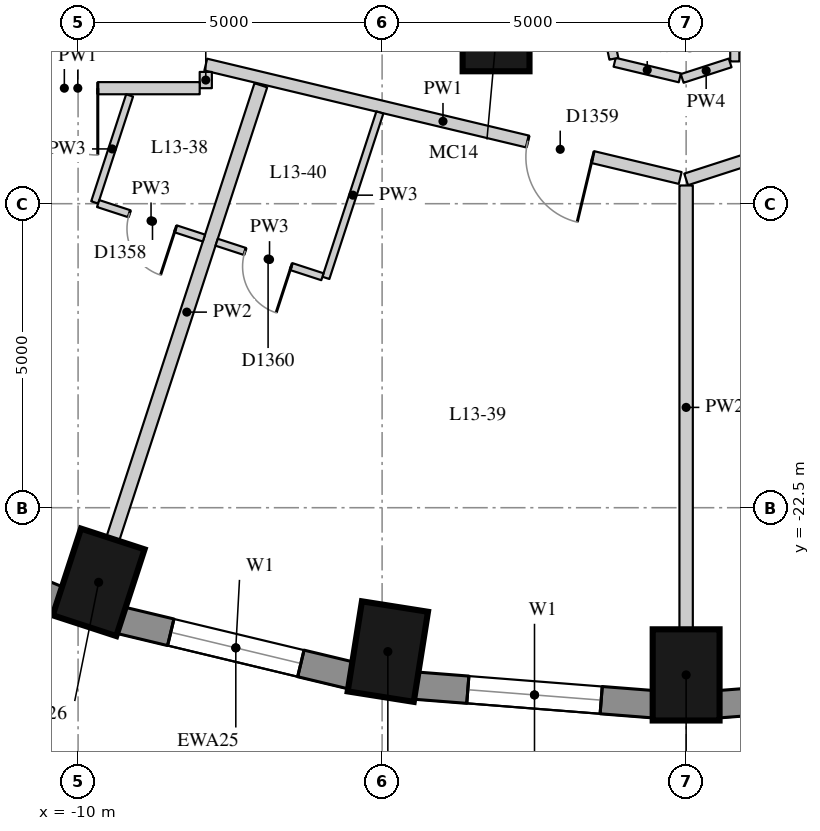
"""IFC4 building model, lengths in metres.
Left out: names, types, materials, properties, quantities, classifications, styles, units other than length and angle.
Written with IfcOpenShell. Run it as: python <this file> out.ifc"""

import sys

from ifc_helpers import new_model, si_unit, direction, frame, frame_2d, origin, origin_2d, place, context, subcontext, project, spatial, rectangle, extrude, element, fill, save


model = new_model("IFC4")
c1 = context("Model", 3, precision=1e-05, world=origin(), true_north=direction((0.0, 1.0)))
c2 = subcontext(c1, "Body", "Model", "MODEL_VIEW")
j1 = project(units=[si_unit("LENGTHUNIT", "METRE"), si_unit("PLANEANGLEUNIT", "RADIAN")], contexts=[c1])
p1 = place(None, origin())
s1 = spatial("IfcSite", under=j1, at=p1, CompositionType="ELEMENT")
p2 = place(p1, origin())
s2 = spatial("IfcBuilding", under=s1, at=p2, CompositionType="ELEMENT")
p3 = place(p2, frame((0.0, 0.0, 51.4)))
s3 = spatial("IfcBuildingStorey", under=s2, at=p3, CompositionType="ELEMENT", Elevation=51.4)
for number, where, z_axis, x_axis in (
    (1, (-9.662, -23.727, 0.0), (0.0, 0.0, 1.0), (-0.31, -0.951, 0.0)),
    (2, (-4.906, -24.866, 0.0), (0.0, 0.0, 1.0), (-0.156, -0.988, 0.0)),
    (3, (0.0, -25.25, 0.0), (0.0, 0.0, 1.0), (0.0, -1.0, 0.0)),
):
    element("IfcColumn", number, at=place(p3, frame(where, z_axis=z_axis, x_axis=x_axis)), inside=s3, PredefinedType="COLUMN", context=c2, shape_type="SweptSolid", body=[
        extrude(rectangle(XDim=1.5, YDim=1.1, at=origin_2d()), origin(), (0.0, 0.0, 1.0), 3.3),
    ])
p4 = place(p3, frame((-3.126, -14.772, 0.0), z_axis=(0.0, 0.0, 1.0), x_axis=(1.0, 0.0, 0.0)))
e4 = element("IfcColumn", 4, at=p4, inside=s3, PredefinedType="COLUMN", context=c2, shape_type="SweptSolid", body=[
    extrude(rectangle(XDim=1.1, YDim=1.1, at=origin_2d()), origin(), (0.0, 0.0, 1.0), 3.3),
])
p5 = place(p3, frame((-13.875, -22.537, 0.0), z_axis=(0.0, 0.0, 1.0), x_axis=(0.923031964282, -0.384723267966, 0.0)))
e5 = element("IfcWall", 5, at=p5, inside=s3, PredefinedType="SOLIDWALL", context=c2, shape_type="SweptSolid", body=[
    extrude(rectangle(XDim=3.856, YDim=0.45, at=frame_2d((1.928, 0.0))), origin(), (0.0, 0.0, 1.0), 3.02),
])
p6 = place(p5, frame((0.828, 0.0, 0.4)))
e6 = element("IfcOpeningElement", 6, at=p6, cuts=e5, PredefinedType="OPENING", context=c2, shape_type="SweptSolid", body=[
    extrude(rectangle(XDim=2.2, YDim=1.75, at=frame_2d((1.1, 0.875))), frame((0.0, 0.235, 0.0), z_axis=(0.0, -1.0, 0.0), x_axis=(1.0, 0.0, 0.0)), (0.0, 0.0, 1.0), 0.47),
])
p7 = place(p3, frame((-9.308, -24.35, 0.0), z_axis=(0.0, 0.0, 1.0), x_axis=(0.972496561493, -0.232917233979, 0.0)))
e7 = element("IfcWall", 7, at=p7, inside=s3, PredefinedType="SOLIDWALL", context=c2, shape_type="SweptSolid", body=[
    extrude(rectangle(XDim=3.911, YDim=0.45, at=frame_2d((1.956, 0.0))), origin(), (0.0, 0.0, 1.0), 3.02),
])
p8 = place(p7, frame((0.855, 0.0, 0.4)))
e8 = element("IfcOpeningElement", 8, at=p8, cuts=e7, PredefinedType="OPENING", context=c2, shape_type="SweptSolid", body=[
    extrude(rectangle(XDim=2.2, YDim=1.75, at=frame_2d((1.1, 0.875))), frame((0.0, 0.235, 0.0), z_axis=(0.0, -1.0, 0.0), x_axis=(1.0, 0.0, 0.0)), (0.0, 0.0, 1.0), 0.47),
])
p9 = place(p3, frame((-4.457, -25.426, 0.0), z_axis=(0.0, 0.0, 1.0), x_axis=(0.996955972145, -0.077966592873, 0.0)))
e9 = element("IfcWall", 9, at=p9, inside=s3, PredefinedType="SOLIDWALL", context=c2, shape_type="SweptSolid", body=[
    extrude(rectangle(XDim=3.939, YDim=0.45, at=frame_2d((1.97, 0.0))), origin(), (0.0, 0.0, 1.0), 3.02),
])
p10 = place(p9, frame((0.87, 0.0, 0.4)))
e10 = element("IfcOpeningElement", 10, at=p10, cuts=e9, PredefinedType="OPENING", context=c2, shape_type="SweptSolid", body=[
    extrude(rectangle(XDim=2.2, YDim=1.75, at=frame_2d((1.1, 0.875))), frame((0.0, 0.235, 0.0), z_axis=(0.0, -1.0, 0.0), x_axis=(1.0, 0.0, 0.0)), (0.0, 0.0, 1.0), 0.47),
])
p11 = place(p3, frame((0.53, -25.733, 0.0), z_axis=(0.0, 0.0, 1.0), x_axis=(0.996955972145, 0.077966592873, 0.0)))
e11 = element("IfcWall", 11, at=p11, inside=s3, PredefinedType="SOLIDWALL", context=c2, shape_type="SweptSolid", body=[
    extrude(rectangle(XDim=3.939, YDim=0.45, at=frame_2d((1.97, 0.0))), origin(), (0.0, 0.0, 1.0), 3.02),
])
p12 = place(p11, frame((0.87, 0.0, 0.4)))
e12 = element("IfcOpeningElement", 12, at=p12, cuts=e11, PredefinedType="OPENING", context=c2, shape_type="SweptSolid", body=[
    extrude(rectangle(XDim=2.2, YDim=1.75, at=frame_2d((1.1, 0.875))), frame((0.0, 0.235, 0.0), z_axis=(0.0, -1.0, 0.0), x_axis=(1.0, 0.0, 0.0)), (0.0, 0.0, 1.0), 0.47),
])
p13 = place(p3, frame((10.792, -13.612, 0.0), z_axis=(0.0, 0.0, 1.0), x_axis=(-0.951542928403, -0.307515943336, 0.0)))
e13 = element("IfcWall", 13, at=p13, inside=s3, PredefinedType="PARTITIONING", context=c2, shape_type="SweptSolid", body=[
    extrude(rectangle(XDim=11.342, YDim=0.2, at=frame_2d((5.671, 0.0))), origin(), (0.0, 0.0, 1.0), 3.02),
])
p14 = place(p13, frame((3.239, 0.0, 0.0)))
e14 = element("IfcOpeningElement", 14, at=p14, cuts=e13, PredefinedType="OPENING", context=c2, shape_type="SweptSolid", body=[
    extrude(rectangle(XDim=1.1, YDim=2.1, at=frame_2d((0.55, 1.05))), frame((0.0, 0.11, 0.0), z_axis=(0.0, -1.0, 0.0), x_axis=(1.0, 0.0, 0.0)), (0.0, 0.0, 1.0), 0.22),
])
p15 = place(p3, frame((-0.098, -17.077, 0.0), z_axis=(0.0, 0.0, 1.0), x_axis=(-0.972607318404, 0.232454305588, 0.0)))
e15 = element("IfcWall", 15, at=p15, inside=s3, PredefinedType="PARTITIONING", context=c2, shape_type="SweptSolid", body=[
    extrude(rectangle(XDim=8.022, YDim=0.2, at=frame_2d((4.011, 0.0))), origin(), (0.0, 0.0, 1.0), 3.02),
])
p16 = place(p15, frame((1.479, 0.0, 0.0)))
e16 = element("IfcOpeningElement", 16, at=p16, cuts=e15, PredefinedType="OPENING", context=c2, shape_type="SweptSolid", body=[
    extrude(rectangle(XDim=1.1, YDim=2.1, at=frame_2d((0.55, 1.05))), frame((0.0, 0.11, 0.0), z_axis=(0.0, -1.0, 0.0), x_axis=(1.0, 0.0, 0.0)), (0.0, 0.0, 1.0), 0.22),
])
p17 = place(p3, frame((-7.9, -15.332, 0.0), z_axis=(0.0, 0.0, 1.0), x_axis=(0.0, -1.0, 0.0)))
e17 = element("IfcWall", 17, at=p17, inside=s3, PredefinedType="PARTITIONING", context=c2, shape_type="SweptSolid", body=[
    extrude(rectangle(XDim=0.268, YDim=0.2, at=frame_2d((0.134, 0.0))), origin(), (0.0, 0.0, 1.0), 3.02),
])
p18 = place(p3, frame((-8.0, -15.6, 0.0), z_axis=(0.0, 0.0, 1.0), x_axis=(-1.0, 0.0, 0.0)))
e18 = element("IfcWall", 18, at=p18, inside=s3, PredefinedType="PARTITIONING", context=c2, shape_type="SweptSolid", body=[
    extrude(rectangle(XDim=4.009, YDim=0.2, at=frame_2d((2.005, 0.0))), origin(), (0.0, 0.0, 1.0), 3.02),
])
p19 = place(p18, frame((1.676, 0.0, 0.0)))
e19 = element("IfcOpeningElement", 19, at=p19, cuts=e18, PredefinedType="OPENING", context=c2, shape_type="SweptSolid", body=[
    extrude(rectangle(XDim=1.1, YDim=2.1, at=frame_2d((0.55, 1.05))), frame((0.0, 0.11, 0.0), z_axis=(0.0, -1.0, 0.0), x_axis=(1.0, 0.0, 0.0)), (0.0, 0.0, 1.0), 0.22),
])
p20 = place(p3, frame((0.8, -9.23, 0.0), z_axis=(0.0, 0.0, 1.0), x_axis=(0.0, -1.0, 0.0)))
e20 = element("IfcWall", 20, at=p20, inside=s3, PredefinedType="PARTITIONING", context=c2, shape_type="SweptSolid", body=[
    extrude(rectangle(XDim=5.93, YDim=0.15, at=frame_2d((2.965, 0.0))), origin(), (0.0, 0.0, 1.0), 3.02),
])
p21 = place(p20, frame((2.515, 0.0, 0.0)))
e21 = element("IfcOpeningElement", 21, at=p21, cuts=e20, PredefinedType="OPENING", context=c2, shape_type="SweptSolid", body=[
    extrude(rectangle(XDim=0.9, YDim=2.1, at=frame_2d((0.45, 1.05))), frame((0.0, 0.085, 0.0), z_axis=(0.0, -1.0, 0.0), x_axis=(1.0, 0.0, 0.0)), (0.0, 0.0, 1.0), 0.17),
])
p22 = place(p3, frame((0.724, -15.184, 0.0), z_axis=(0.0, 0.0, 1.0), x_axis=(-0.951444518554, -0.307820285415, 0.0)))
e22 = element("IfcWall", 22, at=p22, inside=s3, PredefinedType="PARTITIONING", context=c2, shape_type="SweptSolid", body=[
    extrude(rectangle(XDim=0.829, YDim=0.15, at=frame_2d((0.415, 0.0))), origin(), (0.0, 0.0, 1.0), 3.02),
])
p23 = place(p3, frame((-0.104, -15.43, 0.0), z_axis=(0.0, 0.0, 1.0), x_axis=(-0.972630060885, 0.232359128642, 0.0)))
e23 = element("IfcWall", 23, at=p23, inside=s3, PredefinedType="PARTITIONING", context=c2, shape_type="SweptSolid", body=[
    extrude(rectangle(XDim=1.102, YDim=0.15, at=frame_2d((0.551, 0.0))), origin(), (0.0, 0.0, 1.0), 2.42),
])
p24 = place(p3, frame((-1.188, -15.115, 0.0), z_axis=(0.0, 0.0, 1.0), x_axis=(-0.20649628494, 0.978447384536, 0.0)))
e24 = element("IfcWall", 24, at=p24, inside=s3, PredefinedType="PARTITIONING", context=c2, shape_type="SweptSolid", body=[
    extrude(rectangle(XDim=1.925, YDim=0.15, at=frame_2d((0.962, 0.0))), origin(), (0.0, 0.0, 1.0), 3.02),
])
p25 = place(p3, frame((-9.429, -23.014, 0.0), z_axis=(0.0, 0.0, 1.0), x_axis=(0.310249775859, 0.950655077607, 0.0)))
e25 = element("IfcWall", 25, at=p25, inside=s3, PredefinedType="PARTITIONING", context=c2, shape_type="SweptSolid", body=[
    extrude(rectangle(XDim=7.85, YDim=0.22, at=frame_2d((3.925, 0.0))), origin(), (0.0, 0.0, 1.0), 3.02),
])
p26 = place(p3, frame((0.0, -24.5, 0.0), z_axis=(0.0, 0.0, 1.0), x_axis=(0.0, 1.0, 0.0)))
e26 = element("IfcWall", 26, at=p26, inside=s3, PredefinedType="PARTITIONING", context=c2, shape_type="SweptSolid", body=[
    extrude(rectangle(XDim=7.3, YDim=0.22, at=frame_2d((3.65, 0.0))), origin(), (0.0, 0.0, 1.0), 2.47),
])
p27 = place(p3, frame((-9.153, -15.719, 0.0), z_axis=(0.0, 0.0, 1.0), x_axis=(-0.310326382186, -0.950630073435, 0.0)))
e27 = element("IfcWall", 27, at=p27, inside=s3, PredefinedType="PARTITIONING", context=c2, shape_type="SweptSolid", body=[
    extrude(rectangle(XDim=1.851, YDim=0.12, at=frame_2d((0.926, 0.0))), origin(), (0.0, 0.0, 1.0), 3.02),
])
p28 = place(p3, frame((-5.037, -15.999, 0.0), z_axis=(0.0, 0.0, 1.0), x_axis=(-0.310181518973, -0.950677350781, 0.0)))
e28 = element("IfcWall", 28, at=p28, inside=s3, PredefinedType="PARTITIONING", context=c2, shape_type="SweptSolid", body=[
    extrude(rectangle(XDim=2.862, YDim=0.12, at=frame_2d((1.431, 0.0))), origin(), (0.0, 0.0, 1.0), 3.02),
])
p29 = place(p3, frame((-9.67, -17.498, 0.0), z_axis=(0.0, 0.0, 1.0), x_axis=(0.950678536911, -0.31017788357, 0.0)))
e29 = element("IfcWall", 29, at=p29, inside=s3, PredefinedType="PARTITIONING", context=c2, shape_type="SweptSolid", body=[
    extrude(rectangle(XDim=1.83, YDim=0.12, at=frame_2d((0.915, 0.0))), origin(), (0.0, 0.0, 1.0), 3.02),
])
p30 = place(p29, frame((0.54, 0.0, 0.0)))
e30 = element("IfcOpeningElement", 30, at=p30, cuts=e29, PredefinedType="OPENING", context=c2, shape_type="SweptSolid", body=[
    extrude(rectangle(XDim=0.8, YDim=2.1, at=frame_2d((0.4, 1.05))), frame((0.0, 0.07, 0.0), z_axis=(0.0, -1.0, 0.0), x_axis=(1.0, 0.0, 0.0)), (0.0, 0.0, 1.0), 0.14),
])
p31 = place(p3, frame((-5.981, -18.701, 0.0), z_axis=(0.0, 0.0, 1.0), x_axis=(-0.950639191072, 0.310298450524, 0.0)))
e31 = element("IfcWall", 31, at=p31, inside=s3, PredefinedType="PARTITIONING", context=c2, shape_type="SweptSolid", body=[
    extrude(rectangle(XDim=1.83, YDim=0.12, at=frame_2d((0.915, 0.0))), origin(), (0.0, 0.0, 1.0), 3.02),
])
p32 = place(p31, frame((0.54, 0.0, 0.0)))
e32 = element("IfcOpeningElement", 32, at=p32, cuts=e31, PredefinedType="OPENING", context=c2, shape_type="SweptSolid", body=[
    extrude(rectangle(XDim=0.8, YDim=2.1, at=frame_2d((0.4, 1.05))), frame((0.0, 0.07, 0.0), z_axis=(0.0, -1.0, 0.0), x_axis=(1.0, 0.0, 0.0)), (0.0, 0.0, 1.0), 0.14),
])
p33 = place(p8, origin())
e33 = element("IfcWindow", 33, at=p33, inside=s3, PartitioningType="SINGLE_PANEL", PredefinedType="WINDOW", context=c2, shape_type="SweptSolid", body=[
    extrude(rectangle(XDim=2.2, YDim=1.75, at=frame_2d((1.1, 0.875))), frame((0.0, 0.035, 0.0), z_axis=(0.0, -1.0, 0.0), x_axis=(1.0, 0.0, 0.0)), (0.0, 0.0, 1.0), 0.06),
])
fill(e8, e33)
p34 = place(p10, origin())
e34 = element("IfcWindow", 34, at=p34, inside=s3, PartitioningType="SINGLE_PANEL", PredefinedType="WINDOW", context=c2, shape_type="SweptSolid", body=[
    extrude(rectangle(XDim=2.2, YDim=1.75, at=frame_2d((1.1, 0.875))), frame((0.0, 0.035, 0.0), z_axis=(0.0, -1.0, 0.0), x_axis=(1.0, 0.0, 0.0)), (0.0, 0.0, 1.0), 0.06),
])
fill(e10, e34)
p35 = place(p19, origin())
e35 = element("IfcDoor", 35, at=p35, inside=s3, OperationType="SINGLE_SWING_LEFT", PredefinedType="DOOR", context=c2, shape_type="SweptSolid", body=[
    extrude(rectangle(XDim=1.1, YDim=2.1, at=frame_2d((0.55, 1.05))), frame((0.0, 0.025, 0.0), z_axis=(0.0, -1.0, 0.0), x_axis=(1.0, 0.0, 0.0)), (0.0, 0.0, 1.0), 0.05),
])
fill(e19, e35)
p36 = place(p30, origin())
e36 = element("IfcDoor", 36, at=p36, inside=s3, OperationType="SINGLE_SWING_LEFT", PredefinedType="DOOR", context=c2, shape_type="SweptSolid", body=[
    extrude(rectangle(XDim=0.8, YDim=2.1, at=frame_2d((0.4, 1.05))), frame((0.0, 0.025, 0.0), z_axis=(0.0, -1.0, 0.0), x_axis=(1.0, 0.0, 0.0)), (0.0, 0.0, 1.0), 0.05),
])
fill(e30, e36)
p37 = place(p16, origin())
e37 = element("IfcDoor", 37, at=p37, inside=s3, OperationType="SINGLE_SWING_LEFT", PredefinedType="DOOR", context=c2, shape_type="SweptSolid", body=[
    extrude(rectangle(XDim=1.1, YDim=2.1, at=frame_2d((0.55, 1.05))), frame((0.0, 0.025, 0.0), z_axis=(0.0, -1.0, 0.0), x_axis=(1.0, 0.0, 0.0)), (0.0, 0.0, 1.0), 0.05),
])
fill(e16, e37)
p38 = place(p32, origin())
e38 = element("IfcDoor", 38, at=p38, inside=s3, OperationType="SINGLE_SWING_LEFT", PredefinedType="DOOR", context=c2, shape_type="SweptSolid", body=[
    extrude(rectangle(XDim=0.8, YDim=2.1, at=frame_2d((0.4, 1.05))), frame((0.0, 0.025, 0.0), z_axis=(0.0, -1.0, 0.0), x_axis=(1.0, 0.0, 0.0)), (0.0, 0.0, 1.0), 0.05),
])
fill(e32, e38)
save(model, sys.argv[1])
